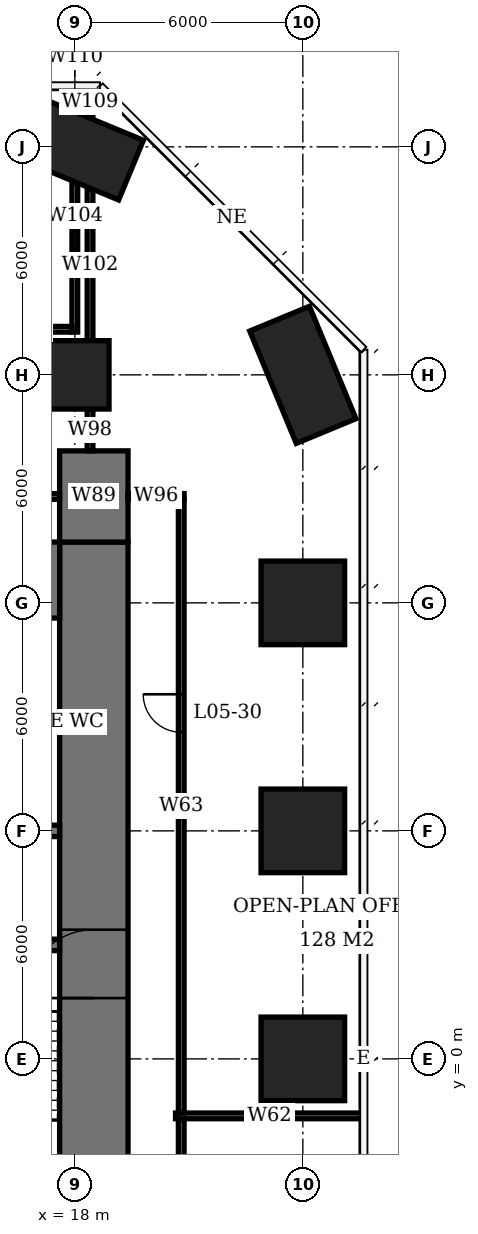
"""IFC4 building model, lengths in metres.
Left out: names, types, materials, properties, quantities, classifications, styles, units other than length and angle.
Written with IfcOpenShell. Run it as: python <this file> out.ifc"""

import sys

from ifc_helpers import new_model, si_unit, direction, frame, frame_2d, origin, origin_2d, place, context, subcontext, project, spatial, rectangle, extrude, element, fill, save


model = new_model("IFC4")
c1 = context("Model", 3, precision=1e-05, world=origin(), true_north=direction((0.0, 1.0)))
c2 = subcontext(c1, "Body", "Model", "MODEL_VIEW")
j1 = project(units=[si_unit("LENGTHUNIT", "METRE"), si_unit("PLANEANGLEUNIT", "RADIAN")], contexts=[c1])
p1 = place(None, origin())
s1 = spatial("IfcSite", under=j1, at=p1, CompositionType="ELEMENT")
p2 = place(p1, origin())
s2 = spatial("IfcBuilding", under=s1, at=p2, CompositionType="ELEMENT")
p3 = place(p2, frame((0.0, 0.0, 26.0)))
s3 = spatial("IfcBuildingStorey", under=s2, at=p3, CompositionType="ELEMENT", Elevation=26.0)
p4 = place(p3, frame((18.0, 18.0, 0.0), z_axis=(0.0, 0.0, 1.0), x_axis=(1.0, 0.0, 0.0)))
e1 = element("IfcColumn", 1, at=p4, inside=s3, PredefinedType="COLUMN", context=c2, shape_type="SweptSolid", body=[
    extrude(rectangle(XDim=1.8, YDim=1.8, at=origin_2d()), origin(), (0.0, 0.0, 1.0), 3.9),
])
p5 = place(p3, frame((18.0, 24.0, 0.0), z_axis=(0.0, 0.0, 1.0), x_axis=(0.923879532511, -0.382683432365, 0.0)))
e2 = element("IfcColumn", 2, at=p5, inside=s3, PredefinedType="COLUMN", context=c2, shape_type="SweptSolid", body=[
    extrude(rectangle(XDim=3.2, YDim=1.7, at=origin_2d()), origin(), (0.0, 0.0, 1.0), 3.9),
])
for number, where, z_axis, x_axis in (
    (3, (24.0, 0.0, 0.0), (0.0, 0.0, 1.0), (1.0, 0.0, 0.0)),
    (4, (24.0, 6.0, 0.0), (0.0, 0.0, 1.0), (1.0, 0.0, 0.0)),
    (5, (24.0, 12.0, 0.0), (0.0, 0.0, 1.0), (1.0, 0.0, 0.0)),
):
    element("IfcColumn", number, at=place(p3, frame(where, z_axis=z_axis, x_axis=x_axis)), inside=s3, PredefinedType="COLUMN", context=c2, shape_type="SweptSolid", body=[
        extrude(rectangle(XDim=2.2, YDim=2.2, at=origin_2d()), origin(), (0.0, 0.0, 1.0), 3.9),
    ])
p6 = place(p3, frame((24.0, 18.0, 0.0), z_axis=(0.0, 0.0, 1.0), x_axis=(0.382683432365, -0.923879532511, 0.0)))
e6 = element("IfcColumn", 6, at=p6, inside=s3, PredefinedType="COLUMN", context=c2, shape_type="SweptSolid", body=[
    extrude(rectangle(XDim=3.2, YDim=1.7, at=origin_2d()), origin(), (0.0, 0.0, 1.0), 3.9),
])
p7 = place(p3, frame((-5.6, 12.6, 0.0), z_axis=(0.0, 0.0, 1.0), x_axis=(1.0, 0.0, 0.0)))
e7 = element("IfcWall", 7, at=p7, inside=s3, PredefinedType="SHEAR", context=c2, shape_type="SweptSolid", body=[
    extrude(rectangle(XDim=23.2, YDim=2.0, at=frame_2d((11.6, 0.0))), origin(), (0.0, 0.0, 1.0), 3.9),
])
p8 = place(p3, frame((18.5, -7.6, 0.0), z_axis=(0.0, 0.0, 1.0), x_axis=(0.0, 1.0, 0.0)))
e8 = element("IfcWall", 8, at=p8, inside=s3, PredefinedType="SHEAR", context=c2, shape_type="SweptSolid", body=[
    extrude(rectangle(XDim=21.2, YDim=1.8, at=frame_2d((10.6, 0.0))), origin(), (0.0, 0.0, 1.0), 3.9),
])
p9 = place(p8, frame((9.2, 0.0, 0.0)))
e9 = element("IfcOpeningElement", 9, at=p9, cuts=e8, PredefinedType="OPENING", context=c2, shape_type="SweptSolid", body=[
    extrude(rectangle(XDim=1.8, YDim=2.4, at=frame_2d((0.9, 1.2))), frame((0.0, 0.91, 0.0), z_axis=(0.0, -1.0, 0.0), x_axis=(1.0, 0.0, 0.0)), (0.0, 0.0, 1.0), 1.82),
])
p10 = place(p3, frame((18.5, 13.6, 0.0), z_axis=(0.0, 0.0, 1.0), x_axis=(0.0, 1.0, 0.0)))
e10 = element("IfcWall", 10, at=p10, inside=s3, PredefinedType="SHEAR", context=c2, shape_type="SweptSolid", body=[
    extrude(rectangle(XDim=2.4, YDim=1.8, at=frame_2d((1.2, 0.0))), origin(), (0.0, 0.0, 1.0), 3.9),
])
p11 = place(p3, frame((12.15, 3.0, 0.0), z_axis=(0.0, 0.0, 1.0), x_axis=(1.0, 0.0, 0.0)))
e11 = element("IfcWall", 11, at=p11, inside=s3, PredefinedType="SHEAR", context=c2, shape_type="SweptSolid", body=[
    extrude(rectangle(XDim=5.45, YDim=0.3, at=frame_2d((2.725, 0.0))), origin(), (0.0, 0.0, 1.0), 3.9),
])
p12 = place(p11, frame((3.25, 0.0, 0.0)))
e12 = element("IfcOpeningElement", 12, at=p12, cuts=e11, PredefinedType="OPENING", context=c2, shape_type="SweptSolid", body=[
    extrude(rectangle(XDim=1.2, YDim=2.1, at=frame_2d((0.6, 1.05))), frame((0.0, 0.16, 0.0), z_axis=(0.0, -1.0, 0.0), x_axis=(1.0, 0.0, 0.0)), (0.0, 0.0, 1.0), 0.32),
])
p13 = place(p11, frame((0.45, 0.0, 0.0)))
e13 = element("IfcOpeningElement", 13, at=p13, cuts=e11, PredefinedType="OPENING", context=c2, shape_type="SweptSolid", body=[
    extrude(rectangle(XDim=0.9, YDim=2.1, at=frame_2d((0.45, 1.05))), frame((0.0, 0.16, 0.0), z_axis=(0.0, -1.0, 0.0), x_axis=(1.0, 0.0, 0.0)), (0.0, 0.0, 1.0), 0.32),
])
p14 = place(p3, frame((-0.15, 6.0, 0.0), z_axis=(0.0, 0.0, 1.0), x_axis=(1.0, 0.0, 0.0)))
e14 = element("IfcWall", 14, at=p14, inside=s3, PredefinedType="SHEAR", context=c2, shape_type="SweptSolid", body=[
    extrude(rectangle(XDim=17.75, YDim=0.3, at=frame_2d((8.875, 0.0))), origin(), (0.0, 0.0, 1.0), 3.9),
])
p15 = place(p14, frame((13.15, 0.0, 0.0)))
e15 = element("IfcOpeningElement", 15, at=p15, cuts=e14, PredefinedType="OPENING", context=c2, shape_type="SweptSolid", body=[
    extrude(rectangle(XDim=0.9, YDim=2.1, at=frame_2d((0.45, 1.05))), frame((0.0, 0.16, 0.0), z_axis=(0.0, -1.0, 0.0), x_axis=(1.0, 0.0, 0.0)), (0.0, 0.0, 1.0), 0.32),
])
p16 = place(p14, frame((16.25, 0.0, 0.0)))
e16 = element("IfcOpeningElement", 16, at=p16, cuts=e14, PredefinedType="OPENING", context=c2, shape_type="SweptSolid", body=[
    extrude(rectangle(XDim=1.0, YDim=2.1, at=frame_2d((0.5, 1.05))), frame((0.0, 0.16, 0.0), z_axis=(0.0, -1.0, 0.0), x_axis=(1.0, 0.0, 0.0)), (0.0, 0.0, 1.0), 0.32),
])
p17 = place(p14, frame((1.1, 0.0, 0.0)))
e17 = element("IfcOpeningElement", 17, at=p17, cuts=e14, PredefinedType="OPENING", context=c2, shape_type="SweptSolid", body=[
    extrude(rectangle(XDim=1.1, YDim=2.1, at=frame_2d((0.55, 1.05))), frame((0.0, 0.16, 0.0), z_axis=(0.0, -1.0, 0.0), x_axis=(1.0, 0.0, 0.0)), (0.0, 0.0, 1.0), 0.32),
])
p18 = place(p14, frame((4.1, 0.0, 0.0)))
e18 = element("IfcOpeningElement", 18, at=p18, cuts=e14, PredefinedType="OPENING", context=c2, shape_type="SweptSolid", body=[
    extrude(rectangle(XDim=1.1, YDim=2.1, at=frame_2d((0.55, 1.05))), frame((0.0, 0.16, 0.0), z_axis=(0.0, -1.0, 0.0), x_axis=(1.0, 0.0, 0.0)), (0.0, 0.0, 1.0), 0.32),
])
p19 = place(p14, frame((7.1, 0.0, 0.0)))
e19 = element("IfcOpeningElement", 19, at=p19, cuts=e14, PredefinedType="OPENING", context=c2, shape_type="SweptSolid", body=[
    extrude(rectangle(XDim=1.1, YDim=2.1, at=frame_2d((0.55, 1.05))), frame((0.0, 0.16, 0.0), z_axis=(0.0, -1.0, 0.0), x_axis=(1.0, 0.0, 0.0)), (0.0, 0.0, 1.0), 0.32),
])
p20 = place(p14, frame((10.1, 0.0, 0.0)))
e20 = element("IfcOpeningElement", 20, at=p20, cuts=e14, PredefinedType="OPENING", context=c2, shape_type="SweptSolid", body=[
    extrude(rectangle(XDim=1.1, YDim=2.1, at=frame_2d((0.55, 1.05))), frame((0.0, 0.16, 0.0), z_axis=(0.0, -1.0, 0.0), x_axis=(1.0, 0.0, 0.0)), (0.0, 0.0, 1.0), 0.32),
])
p21 = place(p3, frame((12.075, 19.2, 0.0), z_axis=(0.0, 0.0, 1.0), x_axis=(1.0, 0.0, 0.0)))
e21 = element("IfcWall", 21, at=p21, inside=s3, PredefinedType="PARTITIONING", context=c2, shape_type="SweptSolid", body=[
    extrude(rectangle(XDim=5.85, YDim=0.15, at=frame_2d((2.925, 0.0))), origin(), (0.0, 0.0, 1.0), 3.65),
])
p22 = place(p21, frame((2.425, 0.0, 0.0)))
e22 = element("IfcOpeningElement", 22, at=p22, cuts=e21, PredefinedType="OPENING", context=c2, shape_type="SweptSolid", body=[
    extrude(rectangle(XDim=1.0, YDim=2.1, at=frame_2d((0.5, 1.05))), frame((0.0, 0.085, 0.0), z_axis=(0.0, -1.0, 0.0), x_axis=(1.0, 0.0, 0.0)), (0.0, 0.0, 1.0), 0.17),
])
p23 = place(p3, frame((18.0, 19.125, 0.0), z_axis=(0.0, 0.0, 1.0), x_axis=(0.0, 1.0, 0.0)))
e23 = element("IfcWall", 23, at=p23, inside=s3, PredefinedType="PARTITIONING", context=c2, shape_type="SweptSolid", body=[
    extrude(rectangle(XDim=3.924, YDim=0.15, at=frame_2d((1.962, 0.0))), origin(), (0.0, 0.0, 1.0), 3.65),
])
p24 = place(p3, frame((18.0, 24.951, 0.0), z_axis=(0.0, 0.0, 1.0), x_axis=(0.0, 1.0, 0.0)))
e24 = element("IfcWall", 24, at=p24, inside=s3, PredefinedType="PARTITIONING", context=c2, shape_type="SweptSolid", body=[
    extrude(rectangle(XDim=0.649, YDim=0.15, at=frame_2d((0.324, 0.0))), origin(), (0.0, 0.0, 1.0), 3.65),
])
p25 = place(p3, frame((4.575, 14.8, 0.0), z_axis=(0.0, 0.0, 1.0), x_axis=(1.0, 0.0, 0.0)))
e25 = element("IfcWall", 25, at=p25, inside=s3, PredefinedType="PARTITIONING", context=c2, shape_type="SweptSolid", body=[
    extrude(rectangle(XDim=13.025, YDim=0.15, at=frame_2d((6.513, 0.0))), origin(), (0.0, 0.0, 1.0), 3.65),
])
p26 = place(p25, frame((7.94, 0.0, 0.0)))
e26 = element("IfcOpeningElement", 26, at=p26, cuts=e25, PredefinedType="OPENING", context=c2, shape_type="SweptSolid", body=[
    extrude(rectangle(XDim=1.0, YDim=2.1, at=frame_2d((0.5, 1.05))), frame((0.0, 0.085, 0.0), z_axis=(0.0, -1.0, 0.0), x_axis=(1.0, 0.0, 0.0)), (0.0, 0.0, 1.0), 0.17),
])
p27 = place(p3, frame((18.4, 16.0, 0.0), z_axis=(0.0, 0.0, 1.0), x_axis=(0.0, 1.0, 0.0)))
e27 = element("IfcWall", 27, at=p27, inside=s3, PredefinedType="PARTITIONING", context=c2, shape_type="SweptSolid", body=[
    extrude(rectangle(XDim=1.1, YDim=0.15, at=frame_2d((0.55, 0.0))), origin(), (0.0, 0.0, 1.0), 3.65),
])
p28 = place(p3, frame((18.4, 18.9, 0.0), z_axis=(0.0, 0.0, 1.0), x_axis=(0.0, 1.0, 0.0)))
e28 = element("IfcWall", 28, at=p28, inside=s3, PredefinedType="PARTITIONING", context=c2, shape_type="SweptSolid", body=[
    extrude(rectangle(XDim=3.983, YDim=0.15, at=frame_2d((1.992, 0.0))), origin(), (0.0, 0.0, 1.0), 3.65),
])
p29 = place(p3, frame((18.4, 24.785, 0.0), z_axis=(0.0, 0.0, 1.0), x_axis=(0.0, 1.0, 0.0)))
e29 = element("IfcWall", 29, at=p29, inside=s3, PredefinedType="PARTITIONING", context=c2, shape_type="SweptSolid", body=[
    extrude(rectangle(XDim=0.815, YDim=0.15, at=frame_2d((0.407, 0.0))), origin(), (0.0, 0.0, 1.0), 3.65),
])
p30 = place(p3, frame((19.4, 14.8, 0.0), z_axis=(0.0, 0.0, 1.0), x_axis=(1.0, 0.0, 0.0)))
e30 = element("IfcWall", 30, at=p30, inside=s3, PredefinedType="PARTITIONING", context=c2, shape_type="SweptSolid", body=[
    extrude(rectangle(XDim=1.475, YDim=0.15, at=frame_2d((0.738, 0.0))), origin(), (0.0, 0.0, 1.0), 3.65),
])
p31 = place(p3, frame((20.8, -8.725, 0.0), z_axis=(0.0, 0.0, 1.0), x_axis=(0.0, 1.0, 0.0)))
e31 = element("IfcWall", 31, at=p31, inside=s3, PredefinedType="PARTITIONING", context=c2, shape_type="SweptSolid", body=[
    extrude(rectangle(XDim=7.15, YDim=0.15, at=frame_2d((3.575, 0.0))), origin(), (0.0, 0.0, 1.0), 3.65),
])
p32 = place(p31, frame((1.98, 0.0, 0.0)))
e32 = element("IfcOpeningElement", 32, at=p32, cuts=e31, PredefinedType="OPENING", context=c2, shape_type="SweptSolid", body=[
    extrude(rectangle(XDim=1.0, YDim=2.1, at=frame_2d((0.5, 1.05))), frame((0.0, 0.085, 0.0), z_axis=(0.0, -1.0, 0.0), x_axis=(1.0, 0.0, 0.0)), (0.0, 0.0, 1.0), 0.17),
])
p33 = place(p3, frame((20.8, -1.425, 0.0), z_axis=(0.0, 0.0, 1.0), x_axis=(0.0, 1.0, 0.0)))
e33 = element("IfcWall", 33, at=p33, inside=s3, PredefinedType="PARTITIONING", context=c2, shape_type="SweptSolid", body=[
    extrude(rectangle(XDim=16.15, YDim=0.15, at=frame_2d((8.075, 0.0))), origin(), (0.0, 0.0, 1.0), 3.65),
])
p34 = place(p33, frame((10.02, 0.0, 0.0)))
e34 = element("IfcOpeningElement", 34, at=p34, cuts=e33, PredefinedType="OPENING", context=c2, shape_type="SweptSolid", body=[
    extrude(rectangle(XDim=1.0, YDim=2.1, at=frame_2d((0.5, 1.05))), frame((0.0, 0.085, 0.0), z_axis=(0.0, -1.0, 0.0), x_axis=(1.0, 0.0, 0.0)), (0.0, 0.0, 1.0), 0.17),
])
p35 = place(p3, frame((20.65, -1.5, 0.0), z_axis=(0.0, 0.0, 1.0), x_axis=(1.0, 0.0, 0.0)))
e35 = element("IfcWall", 35, at=p35, inside=s3, PredefinedType="PARTITIONING", context=c2, shape_type="SweptSolid", body=[
    extrude(rectangle(XDim=4.95, YDim=0.15, at=frame_2d((2.475, 0.0))), origin(), (0.0, 0.0, 1.0), 3.65),
])
p36 = place(p9, origin())
e36 = element("IfcDoor", 36, at=p36, inside=s3, OperationType="DOUBLE_DOOR_SINGLE_SWING", PredefinedType="DOOR", context=c2, shape_type="SweptSolid", body=[
    extrude(rectangle(XDim=1.8, YDim=2.4, at=frame_2d((0.9, 1.2))), frame((0.0, 0.025, 0.0), z_axis=(0.0, -1.0, 0.0), x_axis=(1.0, 0.0, 0.0)), (0.0, 0.0, 1.0), 0.05),
])
fill(e9, e36)
p37 = place(p34, origin())
e37 = element("IfcDoor", 37, at=p37, inside=s3, OperationType="SINGLE_SWING_RIGHT", PredefinedType="DOOR", context=c2, shape_type="SweptSolid", body=[
    extrude(rectangle(XDim=1.0, YDim=2.1, at=frame_2d((0.5, 1.05))), frame((0.0, 0.025, 0.0), z_axis=(0.0, -1.0, 0.0), x_axis=(1.0, 0.0, 0.0)), (0.0, 0.0, 1.0), 0.05),
])
fill(e34, e37)
save(model, sys.argv[1])
